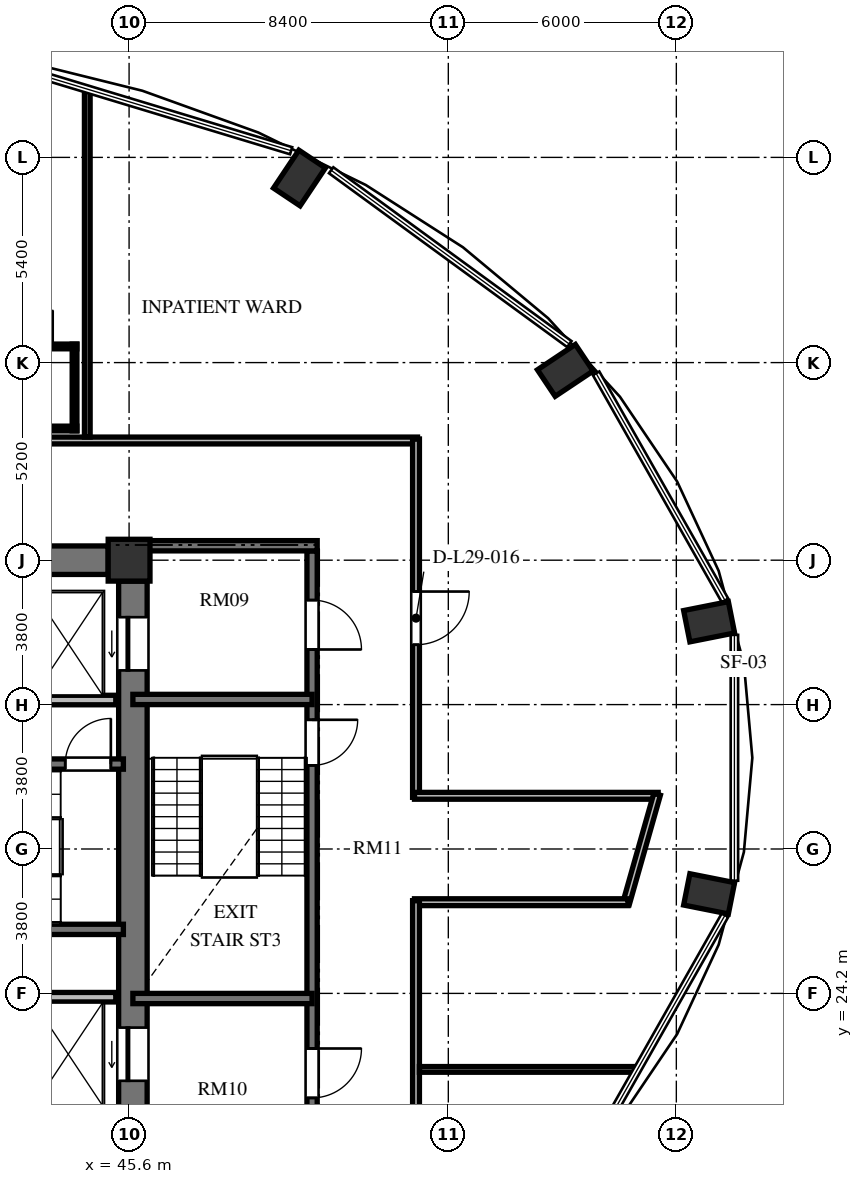
"""IFC4 building model, lengths in metres.
Left out: names, types, materials, properties, quantities, classifications, styles, units other than length and angle.
Written with IfcOpenShell. Run it as: python <this file> out.ifc"""

import sys

from ifc_helpers import new_model, si_unit, direction, frame, frame_2d, origin, origin_2d, place, context, subcontext, project, spatial, rectangle, extrude, element, fill, save


model = new_model("IFC4")
c1 = context("Model", 3, precision=1e-05, world=origin(), true_north=direction((0.0, 1.0)))
c2 = subcontext(c1, "Body", "Model", "MODEL_VIEW")
j1 = project(units=[si_unit("LENGTHUNIT", "METRE"), si_unit("PLANEANGLEUNIT", "RADIAN")], contexts=[c1])
p1 = place(None, origin())
s1 = spatial("IfcSite", under=j1, at=p1, CompositionType="ELEMENT")
p2 = place(p1, origin())
s2 = spatial("IfcBuilding", under=s1, at=p2, CompositionType="ELEMENT")
p3 = place(p2, frame((0.0, 0.0, 114.576)))
s3 = spatial("IfcBuildingStorey", under=s2, at=p3, CompositionType="ELEMENT", Elevation=114.576)
for number, where, z_axis, x_axis in (
    (1, (60.863, 26.82, 0.0), (0.0, 0.0, 1.0), (0.981, -0.195, 0.0)),
    (2, (60.863, 33.98, 0.0), (0.0, 0.0, 1.0), (0.981, 0.195, 0.0)),
    (3, (57.078, 40.595, 0.0), (0.0, 0.0, 1.0), (0.831, 0.556, 0.0)),
    (4, (50.084, 45.657, 0.0), (0.0, 0.0, 1.0), (0.556, 0.831, 0.0)),
):
    element("IfcColumn", number, at=place(p3, frame(where, z_axis=z_axis, x_axis=x_axis)), inside=s3, PredefinedType="COLUMN", context=c2, shape_type="SweptSolid", body=[
        extrude(rectangle(XDim=1.2, YDim=0.84, at=origin_2d()), origin(), (0.0, 0.0, 1.0), 3.648),
    ])
p4 = place(p3, frame((45.6, 35.6, 0.0), z_axis=(0.0, 0.0, 1.0), x_axis=(1.0, 0.0, 0.0)))
e5 = element("IfcColumn", 5, at=p4, inside=s3, PredefinedType="COLUMN", context=c2, shape_type="SweptSolid", body=[
    extrude(rectangle(XDim=1.1, YDim=1.1, at=origin_2d()), origin(), (0.0, 0.0, 1.0), 3.648),
])
p5 = place(p3, frame((45.7, 20.95, 0.0), z_axis=(0.0, 0.0, 1.0), x_axis=(0.0, 1.0, 0.0)))
e6 = element("IfcWall", 6, at=p5, inside=s3, PredefinedType="SHEAR", context=c2, shape_type="SweptSolid", body=[
    extrude(rectangle(XDim=14.1, YDim=0.75, at=frame_2d((7.05, 0.0))), origin(), (0.0, 0.0, 1.0), 3.648),
])
p6 = place(p5, frame((11.75, 0.0, 0.0)))
e7 = element("IfcOpeningElement", 7, at=p6, cuts=e6, PredefinedType="OPENING", context=c2, shape_type="SweptSolid", body=[
    extrude(rectangle(XDim=1.4, YDim=2.3, at=frame_2d((0.7, 1.15))), frame((0.0, 0.385, 0.0), z_axis=(0.0, -1.0, 0.0), x_axis=(1.0, 0.0, 0.0)), (0.0, 0.0, 1.0), 0.77),
])
p7 = place(p5, frame((0.95, 0.0, 0.0)))
e8 = element("IfcOpeningElement", 8, at=p7, cuts=e6, PredefinedType="OPENING", context=c2, shape_type="SweptSolid", body=[
    extrude(rectangle(XDim=1.4, YDim=2.3, at=frame_2d((0.7, 1.15))), frame((0.0, 0.385, 0.0), z_axis=(0.0, -1.0, 0.0), x_axis=(1.0, 0.0, 0.0)), (0.0, 0.0, 1.0), 0.77),
])
p8 = place(p3, frame((39.675, 35.6, 0.0), z_axis=(0.0, 0.0, 1.0), x_axis=(1.0, 0.0, 0.0)))
e9 = element("IfcWall", 9, at=p8, inside=s3, PredefinedType="SHEAR", context=c2, shape_type="SweptSolid", body=[
    extrude(rectangle(XDim=5.375, YDim=0.75, at=frame_2d((2.688, 0.0))), origin(), (0.0, 0.0, 1.0), 3.648),
])
p9 = place(p3, frame((37.465, 30.235, 0.0), z_axis=(0.0, 0.0, 1.0), x_axis=(1.0, 0.0, 0.0)))
e10 = element("IfcWall", 10, at=p9, inside=s3, PredefinedType="SHEAR", context=c2, shape_type="SweptSolid", body=[
    extrude(rectangle(XDim=7.985, YDim=0.27, at=frame_2d((3.992, 0.0))), origin(), (0.0, 0.0, 1.0), 3.648),
])
p10 = place(p9, frame((6.455, 0.0, 0.0)))
e11 = element("IfcOpeningElement", 11, at=p10, cuts=e10, PredefinedType="OPENING", context=c2, shape_type="SweptSolid", body=[
    extrude(rectangle(XDim=1.2, YDim=2.15, at=frame_2d((0.6, 1.075))), frame((0.0, 0.145, 0.0), z_axis=(0.0, -1.0, 0.0), x_axis=(1.0, 0.0, 0.0)), (0.0, 0.0, 1.0), 0.29),
])
p11 = place(p3, frame((37.465, 25.885, 0.0), z_axis=(0.0, 0.0, 1.0), x_axis=(1.0, 0.0, 0.0)))
e12 = element("IfcWall", 12, at=p11, inside=s3, PredefinedType="SHEAR", context=c2, shape_type="SweptSolid", body=[
    extrude(rectangle(XDim=7.985, YDim=0.27, at=frame_2d((3.992, 0.0))), origin(), (0.0, 0.0, 1.0), 3.648),
])
for number, where, z_axis, x_axis in (
    (13, (42.95, 31.92, 0.0), (0.0, 0.0, 1.0), (1.0, 0.0, 0.0)),
    (14, (42.95, 24.1, 0.0), (0.0, 0.0, 1.0), (1.0, 0.0, 0.0)),
):
    element("IfcWall", number, at=place(p3, frame(where, z_axis=z_axis, x_axis=x_axis)), inside=s3, PredefinedType="SOLIDWALL", context=c2, shape_type="SweptSolid", body=[
        extrude(rectangle(XDim=2.3, YDim=0.25, at=frame_2d((1.15, 0.0))), origin(), (0.0, 0.0, 1.0), 3.428),
    ])
p12 = place(p3, frame((50.415, 35.845, 0.0), z_axis=(0.0, 0.0, 1.0), x_axis=(0.0, -1.0, 0.0)))
e15 = element("IfcWall", 15, at=p12, inside=s3, PredefinedType="SHEAR", context=c2, shape_type="SweptSolid", body=[
    extrude(rectangle(XDim=15.825, YDim=0.27, at=frame_2d((7.913, 0.0))), origin(), (0.0, 0.0, 1.0), 3.648),
])
p13 = place(p12, frame((4.445, 0.0, 0.0)))
e16 = element("IfcOpeningElement", 16, at=p13, cuts=e15, PredefinedType="OPENING", context=c2, shape_type="SweptSolid", body=[
    extrude(rectangle(XDim=1.2, YDim=2.15, at=frame_2d((0.6, 1.075))), frame((0.0, 0.145, 0.0), z_axis=(0.0, -1.0, 0.0), x_axis=(1.0, 0.0, 0.0)), (0.0, 0.0, 1.0), 0.29),
])
p14 = place(p12, frame((1.295, 0.0, 0.0)))
e17 = element("IfcOpeningElement", 17, at=p14, cuts=e15, PredefinedType="OPENING", context=c2, shape_type="SweptSolid", body=[
    extrude(rectangle(XDim=1.3, YDim=2.2, at=frame_2d((0.65, 1.1))), frame((0.0, 0.145, 0.0), z_axis=(0.0, -1.0, 0.0), x_axis=(1.0, 0.0, 0.0)), (0.0, 0.0, 1.0), 0.29),
])
p15 = place(p12, frame((13.095, 0.0, 0.0)))
e18 = element("IfcOpeningElement", 18, at=p15, cuts=e15, PredefinedType="OPENING", context=c2, shape_type="SweptSolid", body=[
    extrude(rectangle(XDim=1.3, YDim=2.2, at=frame_2d((0.65, 1.1))), frame((0.0, 0.145, 0.0), z_axis=(0.0, -1.0, 0.0), x_axis=(1.0, 0.0, 0.0)), (0.0, 0.0, 1.0), 0.29),
])
p16 = place(p3, frame((46.075, 35.98, 0.0), z_axis=(0.0, 0.0, 1.0), x_axis=(1.0, 0.0, 0.0)))
e19 = element("IfcWall", 19, at=p16, inside=s3, PredefinedType="SHEAR", context=c2, shape_type="SweptSolid", body=[
    extrude(rectangle(XDim=4.475, YDim=0.27, at=frame_2d((2.238, 0.0))), origin(), (0.0, 0.0, 1.0), 3.648),
])
for number, where, z_axis, x_axis in (
    (20, (45.7, 31.935, 0.0), (0.0, 0.0, 1.0), (1.0, 0.0, 0.0)),
    (21, (45.7, 24.065, 0.0), (0.0, 0.0, 1.0), (1.0, 0.0, 0.0)),
):
    element("IfcWall", number, at=place(p3, frame(where, z_axis=z_axis, x_axis=x_axis)), inside=s3, PredefinedType="SHEAR", context=c2, shape_type="SweptSolid", body=[
        extrude(rectangle(XDim=4.715, YDim=0.27, at=frame_2d((2.357, 0.0))), origin(), (0.0, 0.0, 1.0), 3.648),
    ])
p17 = place(p3, frame((23.287, 38.75, 0.0), z_axis=(0.0, 0.0, 1.0), x_axis=(1.0, 0.0, 0.0)))
e22 = element("IfcWall", 22, at=p17, inside=s3, PredefinedType="PARTITIONING", context=c2, shape_type="SweptSolid", body=[
    extrude(rectangle(XDim=29.903, YDim=0.18, at=frame_2d((14.952, 0.0))), origin(), (0.0, 0.0, 1.0), 3.053),
])
p18 = place(p17, frame((12.615, 0.0, 0.0)))
e23 = element("IfcOpeningElement", 23, at=p18, cuts=e22, PredefinedType="OPENING", context=c2, shape_type="SweptSolid", body=[
    extrude(rectangle(XDim=1.4, YDim=2.2, at=frame_2d((0.7, 1.1))), frame((0.0, 0.1, 0.0), z_axis=(0.0, -1.0, 0.0), x_axis=(1.0, 0.0, 0.0)), (0.0, 0.0, 1.0), 0.2),
])
p19 = place(p17, frame((3.567, 0.0, 0.0)))
e24 = element("IfcOpeningElement", 24, at=p19, cuts=e22, PredefinedType="OPENING", context=c2, shape_type="SweptSolid", body=[
    extrude(rectangle(XDim=1.4, YDim=2.2, at=frame_2d((0.7, 1.1))), frame((0.0, 0.1, 0.0), z_axis=(0.0, -1.0, 0.0), x_axis=(1.0, 0.0, 0.0)), (0.0, 0.0, 1.0), 0.2),
])
p20 = place(p3, frame((53.15, 38.79, 0.0), z_axis=(0.0, 0.0, 1.0), x_axis=(0.0, -1.0, 0.0)))
e25 = element("IfcWall", 25, at=p20, inside=s3, PredefinedType="PARTITIONING", context=c2, shape_type="SweptSolid", body=[
    extrude(rectangle(XDim=9.43, YDim=0.18, at=frame_2d((4.715, 0.0))), origin(), (0.0, 0.0, 1.0), 3.428),
])
p21 = place(p20, frame((4.015, 0.0, 0.0)))
e26 = element("IfcOpeningElement", 26, at=p21, cuts=e25, PredefinedType="OPENING", context=c2, shape_type="SweptSolid", body=[
    extrude(rectangle(XDim=1.4, YDim=2.2, at=frame_2d((0.7, 1.1))), frame((0.0, 0.1, 0.0), z_axis=(0.0, -1.0, 0.0), x_axis=(1.0, 0.0, 0.0)), (0.0, 0.0, 1.0), 0.2),
])
p22 = place(p3, frame((53.11, 29.4, 0.0), z_axis=(0.0, 0.0, 1.0), x_axis=(1.0, 0.0, 0.0)))
e27 = element("IfcWall", 27, at=p22, inside=s3, PredefinedType="PARTITIONING", context=c2, shape_type="SweptSolid", body=[
    extrude(rectangle(XDim=6.413, YDim=0.18, at=frame_2d((3.206, 0.0))), origin(), (0.0, 0.0, 1.0), 3.428),
])
p23 = place(p3, frame((59.494, 29.438, 0.0), z_axis=(0.0, 0.0, 1.0), x_axis=(-0.273222154729, -0.961950962453, 0.0)))
e28 = element("IfcWall", 28, at=p23, inside=s3, PredefinedType="PARTITIONING", context=c2, shape_type="SweptSolid", body=[
    extrude(rectangle(XDim=2.991, YDim=0.18, at=frame_2d((1.495, 0.0))), origin(), (0.0, 0.0, 1.0), 3.428),
])
p24 = place(p3, frame((58.727, 26.6, 0.0), z_axis=(0.0, 0.0, 1.0), x_axis=(-1.0, 0.0, 0.0)))
e29 = element("IfcWall", 29, at=p24, inside=s3, PredefinedType="PARTITIONING", context=c2, shape_type="SweptSolid", body=[
    extrude(rectangle(XDim=5.617, YDim=0.18, at=frame_2d((2.809, 0.0))), origin(), (0.0, 0.0, 1.0), 3.428),
])
p25 = place(p3, frame((53.15, 26.64, 0.0), z_axis=(0.0, 0.0, 1.0), x_axis=(0.0, -1.0, 0.0)))
e30 = element("IfcWall", 30, at=p25, inside=s3, PredefinedType="PARTITIONING", context=c2, shape_type="SweptSolid", body=[
    extrude(rectangle(XDim=6.66, YDim=0.18, at=frame_2d((3.33, 0.0))), origin(), (0.0, 0.0, 1.0), 3.428),
])
p26 = place(p3, frame((53.24, 22.2, 0.0), z_axis=(0.0, 0.0, 1.0), x_axis=(1.0, 0.0, 0.0)))
e31 = element("IfcWall", 31, at=p26, inside=s3, PredefinedType="PARTITIONING", context=c2, shape_type="SweptSolid", body=[
    extrude(rectangle(XDim=5.731, YDim=0.15, at=frame_2d((2.866, 0.0))), origin(), (0.0, 0.0, 1.0), 3.428),
])
p27 = place(p3, frame((44.5, 38.84, 0.0), z_axis=(0.0, 0.0, 1.0), x_axis=(0.0, 1.0, 0.0)))
e32 = element("IfcWall", 32, at=p27, inside=s3, PredefinedType="PARTITIONING", context=c2, shape_type="SweptSolid", body=[
    extrude(rectangle(XDim=9.143, YDim=0.15, at=frame_2d((4.571, 0.0))), origin(), (0.0, 0.0, 1.0), 3.428),
])
p28 = place(p3, frame((42.005, 41.225, 0.0), z_axis=(0.0, 0.0, 1.0), x_axis=(1.0, 0.0, 0.0)))
e33 = element("IfcWall", 33, at=p28, inside=s3, PredefinedType="PARTITIONING", context=c2, shape_type="SweptSolid", body=[
    extrude(rectangle(XDim=2.22, YDim=0.125, at=frame_2d((1.11, 0.0))), origin(), (0.0, 0.0, 1.0), 3.428),
])
p29 = place(p28, frame((0.635, 0.0, 0.0)))
e34 = element("IfcOpeningElement", 34, at=p29, cuts=e33, PredefinedType="OPENING", context=c2, shape_type="SweptSolid", body=[
    extrude(rectangle(XDim=0.95, YDim=2.1, at=frame_2d((0.475, 1.05))), frame((0.0, 0.073, 0.0), z_axis=(0.0, -1.0, 0.0), x_axis=(1.0, 0.0, 0.0)), (0.0, 0.0, 1.0), 0.145),
])
p30 = place(p3, frame((42.005, 39.065, 0.0), z_axis=(0.0, 0.0, 1.0), x_axis=(1.0, 0.0, 0.0)))
e35 = element("IfcWall", 35, at=p30, inside=s3, PredefinedType="PARTITIONING", context=c2, shape_type="SweptSolid", body=[
    extrude(rectangle(XDim=2.22, YDim=0.125, at=frame_2d((1.11, 0.0))), origin(), (0.0, 0.0, 1.0), 3.428),
])
p31 = place(p3, frame((44.165, 39.005, 0.0), z_axis=(0.0, 0.0, 1.0), x_axis=(0.0, 1.0, 0.0)))
e36 = element("IfcWall", 36, at=p31, inside=s3, PredefinedType="PARTITIONING", context=c2, shape_type="SweptSolid", body=[
    extrude(rectangle(XDim=2.28, YDim=0.125, at=frame_2d((1.14, 0.0))), origin(), (0.0, 0.0, 1.0), 3.428),
])
p32 = place(p10, origin())
e37 = element("IfcDoor", 37, at=p32, inside=s3, OperationType="SINGLE_SWING_RIGHT", PredefinedType="DOOR", context=c2, shape_type="SweptSolid", body=[
    extrude(rectangle(XDim=1.2, YDim=2.15, at=frame_2d((0.6, 1.075))), frame((0.0, 0.025, 0.0), z_axis=(0.0, -1.0, 0.0), x_axis=(1.0, 0.0, 0.0)), (0.0, 0.0, 1.0), 0.05),
])
fill(e11, e37)
p33 = place(p6, origin())
e38 = element("IfcDoor", 38, at=p33, inside=s3, OperationType="SLIDING_TO_LEFT", PredefinedType="DOOR", context=c2, shape_type="SweptSolid", body=[
    extrude(rectangle(XDim=1.4, YDim=2.3, at=frame_2d((0.7, 1.15))), frame((0.0, 0.025, 0.0), z_axis=(0.0, -1.0, 0.0), x_axis=(1.0, 0.0, 0.0)), (0.0, 0.0, 1.0), 0.05),
])
fill(e7, e38)
p34 = place(p7, origin())
e39 = element("IfcDoor", 39, at=p34, inside=s3, OperationType="SLIDING_TO_LEFT", PredefinedType="DOOR", context=c2, shape_type="SweptSolid", body=[
    extrude(rectangle(XDim=1.4, YDim=2.3, at=frame_2d((0.7, 1.15))), frame((0.0, 0.025, 0.0), z_axis=(0.0, -1.0, 0.0), x_axis=(1.0, 0.0, 0.0)), (0.0, 0.0, 1.0), 0.05),
])
fill(e8, e39)
p35 = place(p13, origin())
e40 = element("IfcDoor", 40, at=p35, inside=s3, OperationType="SINGLE_SWING_LEFT", PredefinedType="DOOR", context=c2, shape_type="SweptSolid", body=[
    extrude(rectangle(XDim=1.2, YDim=2.15, at=frame_2d((0.6, 1.075))), frame((0.0, 0.025, 0.0), z_axis=(0.0, -1.0, 0.0), x_axis=(1.0, 0.0, 0.0)), (0.0, 0.0, 1.0), 0.05),
])
fill(e16, e40)
p36 = place(p14, origin())
e41 = element("IfcDoor", 41, at=p36, inside=s3, OperationType="SINGLE_SWING_RIGHT", PredefinedType="DOOR", context=c2, shape_type="SweptSolid", body=[
    extrude(rectangle(XDim=1.3, YDim=2.2, at=frame_2d((0.65, 1.1))), frame((0.0, 0.025, 0.0), z_axis=(0.0, -1.0, 0.0), x_axis=(1.0, 0.0, 0.0)), (0.0, 0.0, 1.0), 0.05),
])
fill(e17, e41)
p37 = place(p15, origin())
e42 = element("IfcDoor", 42, at=p37, inside=s3, OperationType="SINGLE_SWING_LEFT", PredefinedType="DOOR", context=c2, shape_type="SweptSolid", body=[
    extrude(rectangle(XDim=1.3, YDim=2.2, at=frame_2d((0.65, 1.1))), frame((0.0, 0.025, 0.0), z_axis=(0.0, -1.0, 0.0), x_axis=(1.0, 0.0, 0.0)), (0.0, 0.0, 1.0), 0.05),
])
fill(e18, e42)
p38 = place(p21, origin())
e43 = element("IfcDoor", 43, at=p38, inside=s3, OperationType="SINGLE_SWING_LEFT", PredefinedType="DOOR", context=c2, shape_type="SweptSolid", body=[
    extrude(rectangle(XDim=1.4, YDim=2.2, at=frame_2d((0.7, 1.1))), frame((0.0, 0.025, 0.0), z_axis=(0.0, -1.0, 0.0), x_axis=(1.0, 0.0, 0.0)), (0.0, 0.0, 1.0), 0.05),
])
fill(e26, e43)
p39 = place(p29, origin())
e44 = element("IfcDoor", 44, at=p39, inside=s3, OperationType="SINGLE_SWING_RIGHT", PredefinedType="DOOR", context=c2, shape_type="SweptSolid", body=[
    extrude(rectangle(XDim=0.95, YDim=2.1, at=frame_2d((0.475, 1.05))), frame((0.0, 0.025, 0.0), z_axis=(0.0, -1.0, 0.0), x_axis=(1.0, 0.0, 0.0)), (0.0, 0.0, 1.0), 0.05),
])
fill(e34, e44)
save(model, sys.argv[1])
